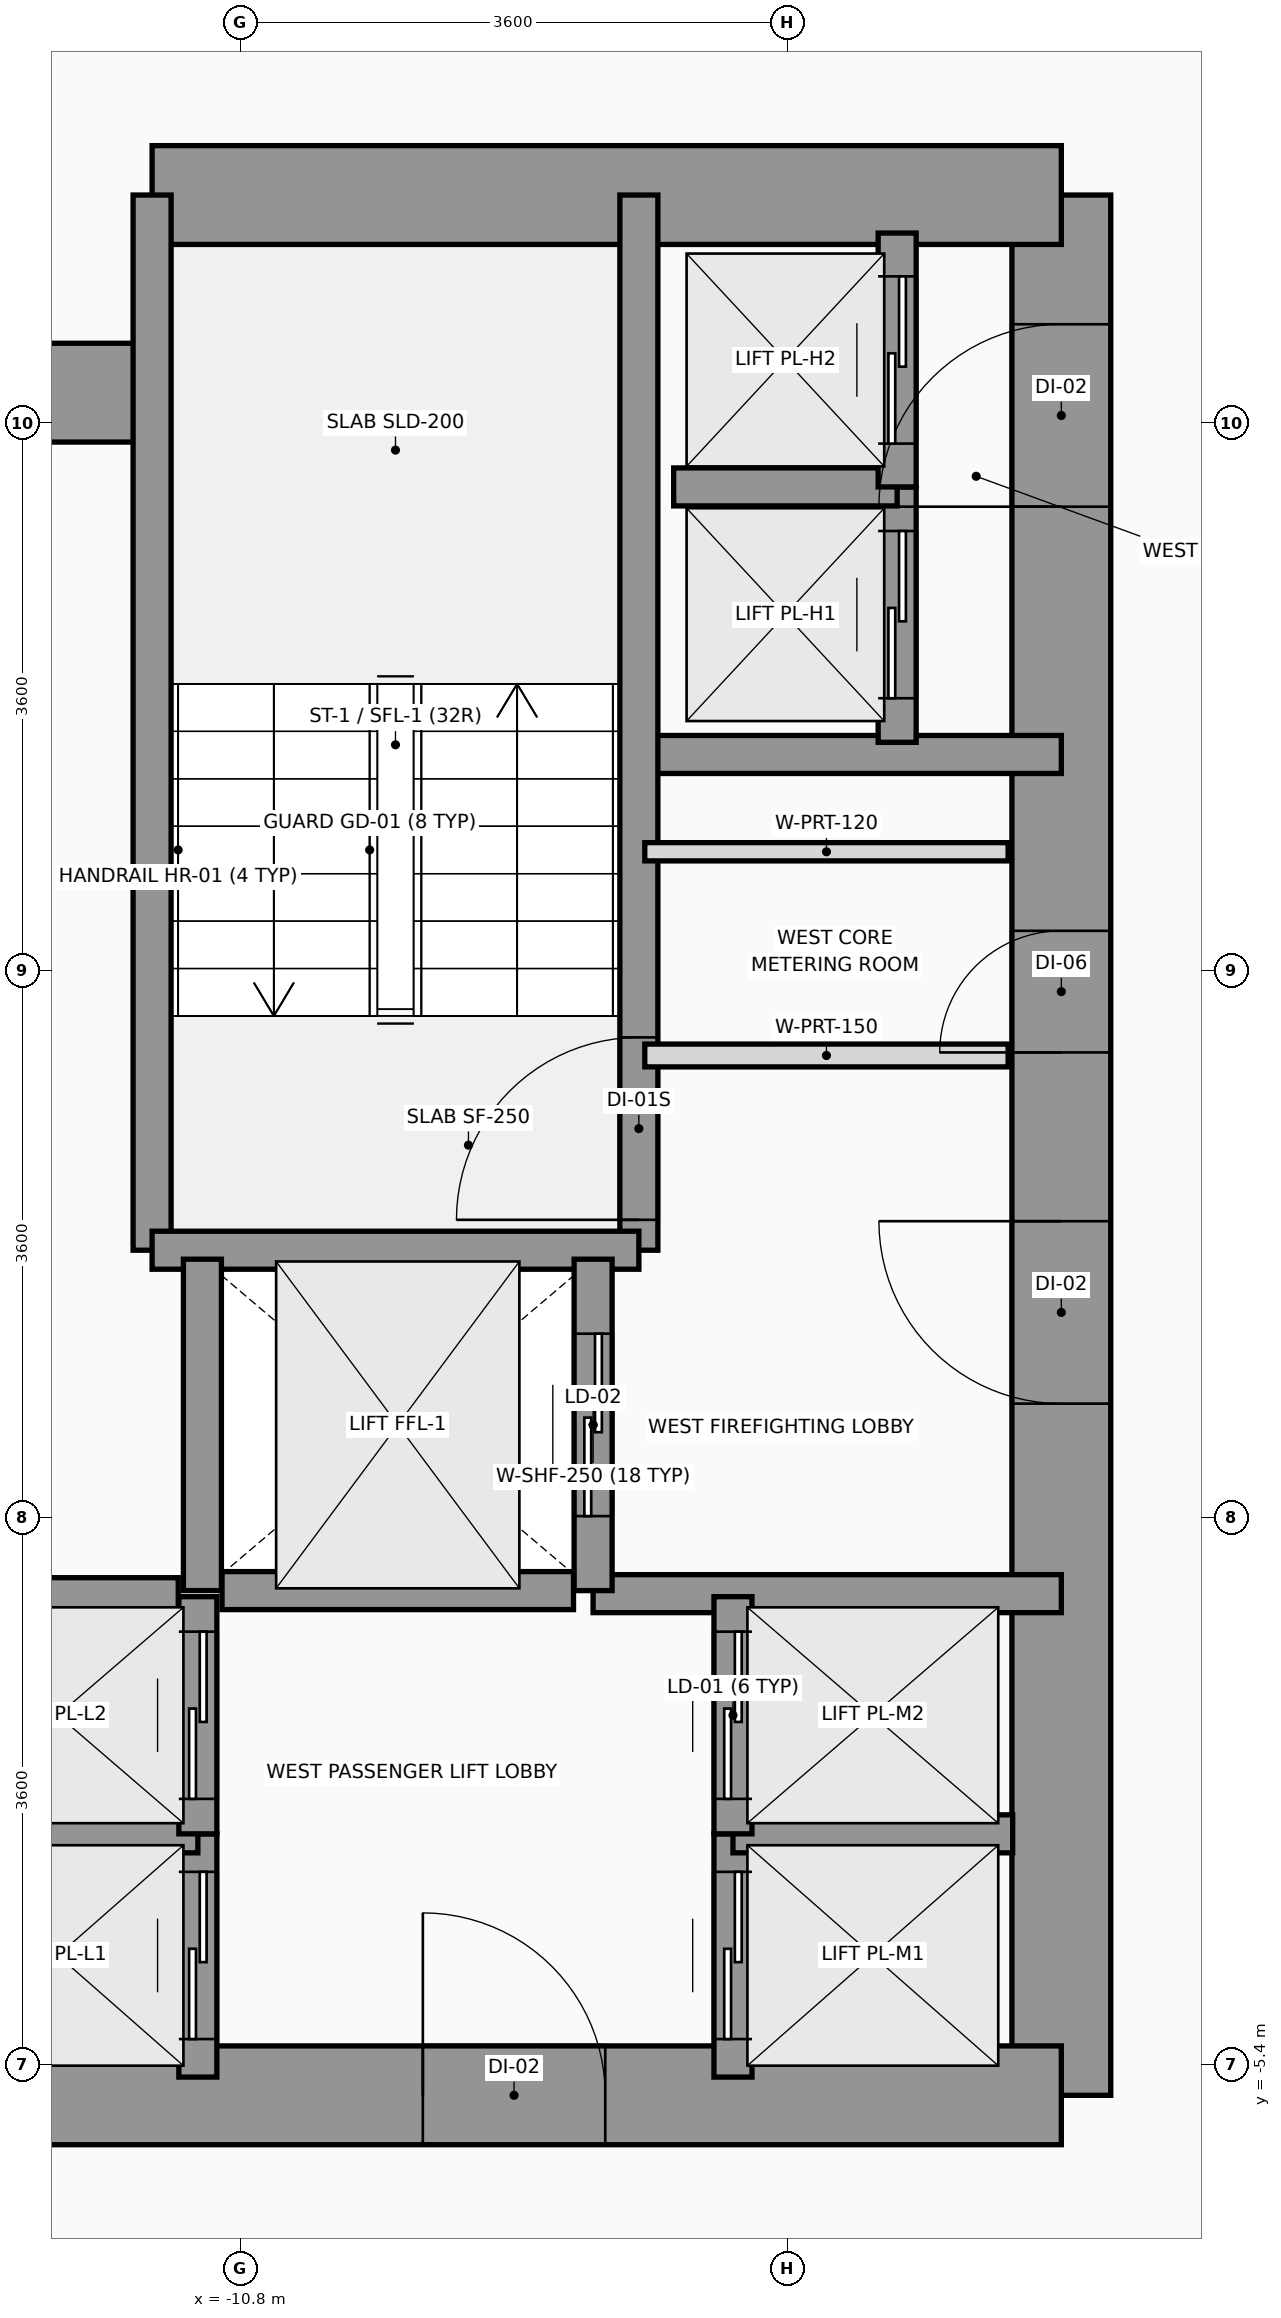
"""IFC4 building model, lengths in metres.
Left out: names, types, materials, properties, quantities, classifications, styles, units other than length and angle.
Written with IfcOpenShell. Run it as: python <this file> out.ifc"""

import sys

from ifc_helpers import new_model, si_unit, direction, frame, frame_2d, origin, place, context, subcontext, project, spatial, rectangle, extrude, source, transform, mapped, element, fill, save


model = new_model("IFC4")
c1 = context("Model", 3, precision=1e-05, world=origin(), true_north=direction((0.0, 1.0)))
c2 = subcontext(c1, "Body", "Model", "MODEL_VIEW")
j1 = project(units=[si_unit("LENGTHUNIT", "METRE"), si_unit("PLANEANGLEUNIT", "RADIAN")], contexts=[c1])
p1 = place(None, origin())
s1 = spatial("IfcSite", under=j1, at=p1, CompositionType="ELEMENT")
p2 = place(p1, origin())
s2 = spatial("IfcBuilding", under=s1, at=p2, CompositionType="ELEMENT")
p3 = place(p2, origin())
s3 = spatial("IfcBuildingStorey", under=s2, at=p3, CompositionType="ELEMENT", Elevation=0.0)
p4 = place(p3, frame((-5.4, -5.6, 0.0), z_axis=(0.0, 0.0, 1.0), x_axis=(0.0, 1.0, 0.0)))
e1 = element("IfcWall", 1, at=p4, inside=s3, PredefinedType="SHEAR", context=c2, shape_type="SweptSolid", body=[
    extrude(rectangle(XDim=12.5, YDim=0.65, at=frame_2d((6.25, 0.0))), origin(), (0.0, 0.0, 1.0), 5.15),
])
p5 = place(p4, frame((4.55, 0.0, 0.0)))
e2 = element("IfcOpeningElement", 2, at=p5, cuts=e1, PredefinedType="OPENING", context=c2, shape_type="SweptSolid", body=[
    extrude(rectangle(XDim=1.2, YDim=2.2, at=frame_2d((0.6, 1.1))), frame((0.0, 0.335, 0.0), z_axis=(0.0, -1.0, 0.0), x_axis=(1.0, 0.0, 0.0)), (0.0, 0.0, 1.0), 0.67),
])
p6 = place(p4, frame((10.45, 0.0, 0.0)))
e3 = element("IfcOpeningElement", 3, at=p6, cuts=e1, PredefinedType="OPENING", context=c2, shape_type="SweptSolid", body=[
    extrude(rectangle(XDim=1.2, YDim=2.2, at=frame_2d((0.6, 1.1))), frame((0.0, 0.335, 0.0), z_axis=(0.0, -1.0, 0.0), x_axis=(1.0, 0.0, 0.0)), (0.0, 0.0, 1.0), 0.67),
])
p7 = place(p4, frame((6.86, 0.0, 0.0)))
e4 = element("IfcOpeningElement", 4, at=p7, cuts=e1, PredefinedType="OPENING", context=c2, shape_type="SweptSolid", body=[
    extrude(rectangle(XDim=0.8, YDim=2.1, at=frame_2d((0.4, 1.05))), frame((0.0, 0.335, 0.0), z_axis=(0.0, -1.0, 0.0), x_axis=(1.0, 0.0, 0.0)), (0.0, 0.0, 1.0), 0.67),
])
p8 = place(p3, frame((-11.381, 6.9, 0.0), z_axis=(0.0, 0.0, 1.0), x_axis=(1.0, 0.0, 0.0)))
e5 = element("IfcWall", 5, at=p8, inside=s3, PredefinedType="SHEAR", context=c2, shape_type="SweptSolid", body=[
    extrude(rectangle(XDim=5.981, YDim=0.65, at=frame_2d((2.991, 0.0))), origin(), (0.0, 0.0, 1.0), 5.15),
])
p9 = place(p3, frame((-13.2, 5.6, 0.0), z_axis=(0.0, 0.0, 1.0), x_axis=(1.0, 0.0, 0.0)))
e6 = element("IfcWall", 6, at=p9, inside=s3, PredefinedType="SHEAR", context=c2, shape_type="SweptSolid", body=[
    extrude(rectangle(XDim=1.819, YDim=0.65, at=frame_2d((0.909, 0.0))), origin(), (0.0, 0.0, 1.0), 5.15),
])
p10 = place(p3, frame((-13.2, -5.6, 0.0), z_axis=(0.0, 0.0, 1.0), x_axis=(1.0, 0.0, 0.0)))
e7 = element("IfcWall", 7, at=p10, inside=s3, PredefinedType="SHEAR", context=c2, shape_type="SweptSolid", body=[
    extrude(rectangle(XDim=7.8, YDim=0.65, at=frame_2d((3.9, 0.0))), origin(), (0.0, 0.0, 1.0), 5.15),
])
p11 = place(p10, frame((3.6, 0.0, 0.0)))
e8 = element("IfcOpeningElement", 8, at=p11, cuts=e7, PredefinedType="OPENING", context=c2, shape_type="SweptSolid", body=[
    extrude(rectangle(XDim=1.2, YDim=2.2, at=frame_2d((0.6, 1.1))), frame((0.0, 0.335, 0.0), z_axis=(0.0, -1.0, 0.0), x_axis=(1.0, 0.0, 0.0)), (0.0, 0.0, 1.0), 0.67),
])
p12 = place(p3, frame((-8.18, 3.22, 0.0), z_axis=(0.0, 0.0, 1.0), x_axis=(1.0, 0.0, 0.0)))
e9 = element("IfcWall", 9, at=p12, inside=s3, PredefinedType="SOLIDWALL", context=c2, shape_type="SweptSolid", body=[
    extrude(rectangle(XDim=2.78, YDim=0.25, at=frame_2d((1.39, 0.0))), origin(), (0.0, 0.0, 1.0), 5.15),
])
p13 = place(p3, frame((-8.48, -2.3, 0.0), z_axis=(0.0, 0.0, 1.0), x_axis=(1.0, 0.0, 0.0)))
e10 = element("IfcWall", 10, at=p13, inside=s3, PredefinedType="SOLIDWALL", context=c2, shape_type="SweptSolid", body=[
    extrude(rectangle(XDim=3.08, YDim=0.25, at=frame_2d((1.54, 0.0))), origin(), (0.0, 0.0, 1.0), 5.15),
])
p14 = place(p3, frame((-8.179, -0.041, 0.0), z_axis=(0.0, 0.0, 1.0), x_axis=(0.0, 1.0, 0.0)))
e11 = element("IfcWall", 11, at=p14, inside=s3, PredefinedType="SOLIDWALL", context=c2, shape_type="SweptSolid", body=[
    extrude(rectangle(XDim=6.941, YDim=0.25, at=frame_2d((3.47, 0.0))), origin(), (0.0, 0.0, 1.0), 5.15),
])
p15 = place(p14, frame((0.2, 0.0, 0.0)))
e12 = element("IfcOpeningElement", 12, at=p15, cuts=e11, PredefinedType="OPENING", context=c2, shape_type="SweptSolid", body=[
    extrude(rectangle(XDim=1.2, YDim=2.2, at=frame_2d((0.6, 1.1))), frame((0.0, 0.135, 0.0), z_axis=(0.0, -1.0, 0.0), x_axis=(1.0, 0.0, 0.0)), (0.0, 0.0, 1.0), 0.27),
])
p16 = place(p3, frame((-11.381, -0.041, 0.0), z_axis=(0.0, 0.0, 1.0), x_axis=(0.0, 1.0, 0.0)))
e13 = element("IfcWall", 13, at=p16, inside=s3, PredefinedType="SOLIDWALL", context=c2, shape_type="SweptSolid", body=[
    extrude(rectangle(XDim=6.941, YDim=0.25, at=frame_2d((3.47, 0.0))), origin(), (0.0, 0.0, 1.0), 5.15),
])
p17 = place(p3, frame((-11.381, -0.041, 0.0), z_axis=(0.0, 0.0, 1.0), x_axis=(1.0, 0.0, 0.0)))
e14 = element("IfcWall", 14, at=p17, inside=s3, PredefinedType="SOLIDWALL", context=c2, shape_type="SweptSolid", body=[
    extrude(rectangle(XDim=3.202, YDim=0.25, at=frame_2d((1.601, 0.0))), origin(), (0.0, 0.0, 1.0), 5.15),
])
p18 = place(p3, frame((-11.05, -2.28, 0.0), z_axis=(0.0, 0.0, 1.0), x_axis=(0.0, 1.0, 0.0)))
e15 = element("IfcWall", 15, at=p18, inside=s3, PredefinedType="SOLIDWALL", context=c2, shape_type="SweptSolid", body=[
    extrude(rectangle(XDim=2.18, YDim=0.25, at=frame_2d((1.09, 0.0))), origin(), (0.0, 0.0, 1.0), 5.15),
])
p19 = place(p3, frame((-8.48, -2.28, 0.0), z_axis=(0.0, 0.0, 1.0), x_axis=(0.0, 1.0, 0.0)))
e16 = element("IfcWall", 16, at=p19, inside=s3, PredefinedType="SOLIDWALL", context=c2, shape_type="SweptSolid", body=[
    extrude(rectangle(XDim=2.18, YDim=0.25, at=frame_2d((1.09, 0.0))), origin(), (0.0, 0.0, 1.0), 5.15),
])
p20 = place(p19, frame((0.49, 0.0, 0.0)))
e17 = element("IfcOpeningElement", 17, at=p20, cuts=e16, PredefinedType="OPENING", context=c2, shape_type="SweptSolid", body=[
    extrude(rectangle(XDim=1.2, YDim=2.2, at=frame_2d((0.6, 1.1))), frame((0.0, 0.135, 0.0), z_axis=(0.0, -1.0, 0.0), x_axis=(1.0, 0.0, 0.0)), (0.0, 0.0, 1.0), 0.27),
])
p21 = place(p3, frame((-10.921, -2.28, 0.0), z_axis=(0.0, 0.0, 1.0), x_axis=(1.0, 0.0, 0.0)))
e18 = element("IfcWall", 18, at=p21, inside=s3, PredefinedType="SOLIDWALL", context=c2, shape_type="SweptSolid", body=[
    extrude(rectangle(XDim=2.312, YDim=0.25, at=frame_2d((1.156, 0.0))), origin(), (0.0, 0.0, 1.0), 5.15),
])
p22 = place(p3, frame((-11.08, -5.48, 0.0), z_axis=(0.0, 0.0, 1.0), x_axis=(0.0, 1.0, 0.0)))
e19 = element("IfcWall", 19, at=p22, inside=s3, PredefinedType="SOLIDWALL", context=c2, shape_type="SweptSolid", body=[
    extrude(rectangle(XDim=1.6, YDim=0.25, at=frame_2d((0.8, 0.0))), origin(), (0.0, 0.0, 1.0), 5.15),
])
p23 = place(p22, frame((0.25, 0.0, 0.0)))
e20 = element("IfcOpeningElement", 20, at=p23, cuts=e19, PredefinedType="OPENING", context=c2, shape_type="SweptSolid", body=[
    extrude(rectangle(XDim=1.1, YDim=2.2, at=frame_2d((0.55, 1.1))), frame((0.0, 0.135, 0.0), z_axis=(0.0, -1.0, 0.0), x_axis=(1.0, 0.0, 0.0)), (0.0, 0.0, 1.0), 0.27),
])
p24 = place(p3, frame((-12.92, -3.88, 0.0), z_axis=(0.0, 0.0, 1.0), x_axis=(1.0, 0.0, 0.0)))
e21 = element("IfcWall", 21, at=p24, inside=s3, PredefinedType="SOLIDWALL", context=c2, shape_type="SweptSolid", body=[
    extrude(rectangle(XDim=1.84, YDim=0.25, at=frame_2d((0.92, 0.0))), origin(), (0.0, 0.0, 1.0), 5.15),
])
p25 = place(p3, frame((-11.08, -3.88, 0.0), z_axis=(0.0, 0.0, 1.0), x_axis=(0.0, 1.0, 0.0)))
e22 = element("IfcWall", 22, at=p25, inside=s3, PredefinedType="SOLIDWALL", context=c2, shape_type="SweptSolid", body=[
    extrude(rectangle(XDim=1.56, YDim=0.25, at=frame_2d((0.78, 0.0))), origin(), (0.0, 0.0, 1.0), 5.15),
])
p26 = place(p25, frame((0.23, 0.0, 0.0)))
e23 = element("IfcOpeningElement", 23, at=p26, cuts=e22, PredefinedType="OPENING", context=c2, shape_type="SweptSolid", body=[
    extrude(rectangle(XDim=1.1, YDim=2.2, at=frame_2d((0.55, 1.1))), frame((0.0, 0.135, 0.0), z_axis=(0.0, -1.0, 0.0), x_axis=(1.0, 0.0, 0.0)), (0.0, 0.0, 1.0), 0.27),
])
p27 = place(p3, frame((-12.791, -2.32, 0.0), z_axis=(0.0, 0.0, 1.0), x_axis=(1.0, 0.0, 0.0)))
e24 = element("IfcWall", 24, at=p27, inside=s3, PredefinedType="SOLIDWALL", context=c2, shape_type="SweptSolid", body=[
    extrude(rectangle(XDim=1.582, YDim=0.25, at=frame_2d((0.791, 0.0))), origin(), (0.0, 0.0, 1.0), 5.15),
])
p28 = place(p3, frame((-7.56, -5.48, 0.0), z_axis=(0.0, 0.0, 1.0), x_axis=(0.0, 1.0, 0.0)))
e25 = element("IfcWall", 25, at=p28, inside=s3, PredefinedType="SOLIDWALL", context=c2, shape_type="SweptSolid", body=[
    extrude(rectangle(XDim=1.6, YDim=0.25, at=frame_2d((0.8, 0.0))), origin(), (0.0, 0.0, 1.0), 5.15),
])
p29 = place(p28, frame((0.25, 0.0, 0.0)))
e26 = element("IfcOpeningElement", 26, at=p29, cuts=e25, PredefinedType="OPENING", context=c2, shape_type="SweptSolid", body=[
    extrude(rectangle(XDim=1.1, YDim=2.2, at=frame_2d((0.55, 1.1))), frame((0.0, 0.135, 0.0), z_axis=(0.0, -1.0, 0.0), x_axis=(1.0, 0.0, 0.0)), (0.0, 0.0, 1.0), 0.27),
])
p30 = place(p3, frame((-7.56, -3.88, 0.0), z_axis=(0.0, 0.0, 1.0), x_axis=(1.0, 0.0, 0.0)))
e27 = element("IfcWall", 27, at=p30, inside=s3, PredefinedType="SOLIDWALL", context=c2, shape_type="SweptSolid", body=[
    extrude(rectangle(XDim=1.84, YDim=0.25, at=frame_2d((0.92, 0.0))), origin(), (0.0, 0.0, 1.0), 5.15),
])
p31 = place(p3, frame((-7.56, -3.88, 0.0), z_axis=(0.0, 0.0, 1.0), x_axis=(0.0, 1.0, 0.0)))
e28 = element("IfcWall", 28, at=p31, inside=s3, PredefinedType="SOLIDWALL", context=c2, shape_type="SweptSolid", body=[
    extrude(rectangle(XDim=1.56, YDim=0.25, at=frame_2d((0.78, 0.0))), origin(), (0.0, 0.0, 1.0), 5.15),
])
p32 = place(p31, frame((0.23, 0.0, 0.0)))
e29 = element("IfcOpeningElement", 29, at=p32, cuts=e28, PredefinedType="OPENING", context=c2, shape_type="SweptSolid", body=[
    extrude(rectangle(XDim=1.1, YDim=2.2, at=frame_2d((0.55, 1.1))), frame((0.0, 0.135, 0.0), z_axis=(0.0, -1.0, 0.0), x_axis=(1.0, 0.0, 0.0)), (0.0, 0.0, 1.0), 0.27),
])
p33 = place(p3, frame((-6.48, 3.3, 0.0), z_axis=(0.0, 0.0, 1.0), x_axis=(0.0, 1.0, 0.0)))
e30 = element("IfcWall", 30, at=p33, inside=s3, PredefinedType="SOLIDWALL", context=c2, shape_type="SweptSolid", body=[
    extrude(rectangle(XDim=1.68, YDim=0.25, at=frame_2d((0.84, 0.0))), origin(), (0.0, 0.0, 1.0), 5.15),
])
p34 = place(p33, frame((0.29, 0.0, 0.0)))
e31 = element("IfcOpeningElement", 31, at=p34, cuts=e30, PredefinedType="OPENING", context=c2, shape_type="SweptSolid", body=[
    extrude(rectangle(XDim=1.1, YDim=2.2, at=frame_2d((0.55, 1.1))), frame((0.0, 0.135, 0.0), z_axis=(0.0, -1.0, 0.0), x_axis=(1.0, 0.0, 0.0)), (0.0, 0.0, 1.0), 0.27),
])
p35 = place(p3, frame((-7.95, 4.98, 0.0), z_axis=(0.0, 0.0, 1.0), x_axis=(1.0, 0.0, 0.0)))
e32 = element("IfcWall", 32, at=p35, inside=s3, PredefinedType="SOLIDWALL", context=c2, shape_type="SweptSolid", body=[
    extrude(rectangle(XDim=1.47, YDim=0.25, at=frame_2d((0.735, 0.0))), origin(), (0.0, 0.0, 1.0), 5.15),
])
p36 = place(p3, frame((-6.48, 4.98, 0.0), z_axis=(0.0, 0.0, 1.0), x_axis=(0.0, 1.0, 0.0)))
e33 = element("IfcWall", 33, at=p36, inside=s3, PredefinedType="SOLIDWALL", context=c2, shape_type="SweptSolid", body=[
    extrude(rectangle(XDim=1.67, YDim=0.25, at=frame_2d((0.835, 0.0))), origin(), (0.0, 0.0, 1.0), 5.15),
])
p37 = place(p36, frame((0.285, 0.0, 0.0)))
e34 = element("IfcOpeningElement", 34, at=p37, cuts=e33, PredefinedType="OPENING", context=c2, shape_type="SweptSolid", body=[
    extrude(rectangle(XDim=1.1, YDim=2.2, at=frame_2d((0.55, 1.1))), frame((0.0, 0.135, 0.0), z_axis=(0.0, -1.0, 0.0), x_axis=(1.0, 0.0, 0.0)), (0.0, 0.0, 1.0), 0.27),
])
p38 = place(p3, frame((-8.14, 1.24, 0.0), z_axis=(0.0, 0.0, 1.0), x_axis=(1.0, 0.0, 0.0)))
e35 = element("IfcWall", 35, at=p38, inside=s3, PredefinedType="PARTITIONING", context=c2, shape_type="SweptSolid", body=[
    extrude(rectangle(XDim=2.39, YDim=0.15, at=frame_2d((1.195, 0.0))), origin(), (0.0, 0.0, 1.0), 4.25),
])
p39 = place(p3, frame((-8.14, 2.58, 0.0), z_axis=(0.0, 0.0, 1.0), x_axis=(1.0, 0.0, 0.0)))
e36 = element("IfcWall", 36, at=p39, inside=s3, PredefinedType="PARTITIONING", context=c2, shape_type="SweptSolid", body=[
    extrude(rectangle(XDim=2.39, YDim=0.12, at=frame_2d((1.195, 0.0))), origin(), (0.0, 0.0, 1.0), 4.25),
])
m1 = source(origin(), c2, "Body", "SweptSolid", [
    extrude(rectangle(XDim=1.2, YDim=2.2, at=frame_2d((0.6, 1.1))), frame((0.0, 0.025, 0.0), z_axis=(0.0, -1.0, 0.0), x_axis=(1.0, 0.0, 0.0)), (0.0, 0.0, 1.0), 0.05),
])
p40 = place(p15, origin())
e37 = element("IfcDoor", 37, at=p40, inside=s3, OperationType="SINGLE_SWING_LEFT", PredefinedType="DOOR", context=c2, shape_type="MappedRepresentation", body=[
    mapped(m1, transform((0.0, 0.0, 0.0), x_axis=(1.0, 0.0, 0.0), y_axis=(0.0, 1.0, 0.0), z_axis=(0.0, 0.0, 1.0), scale=1.0)),
])
fill(e12, e37)
p41 = place(p5, origin())
e38 = element("IfcDoor", 38, at=p41, inside=s3, OperationType="SINGLE_SWING_RIGHT", PredefinedType="DOOR", context=c2, shape_type="MappedRepresentation", body=[
    mapped(m1, transform((0.0, 0.0, 0.0), x_axis=(1.0, 0.0, 0.0), y_axis=(0.0, 1.0, 0.0), z_axis=(0.0, 0.0, 1.0), scale=1.0)),
])
fill(e2, e38)
p42 = place(p6, origin())
e39 = element("IfcDoor", 39, at=p42, inside=s3, OperationType="SINGLE_SWING_LEFT", PredefinedType="DOOR", context=c2, shape_type="MappedRepresentation", body=[
    mapped(m1, transform((0.0, 0.0, 0.0), x_axis=(1.0, 0.0, 0.0), y_axis=(0.0, 1.0, 0.0), z_axis=(0.0, 0.0, 1.0), scale=1.0)),
])
fill(e3, e39)
p43 = place(p11, origin())
e40 = element("IfcDoor", 40, at=p43, inside=s3, OperationType="SINGLE_SWING_LEFT", PredefinedType="DOOR", context=c2, shape_type="MappedRepresentation", body=[
    mapped(m1, transform((0.0, 0.0, 0.0), x_axis=(1.0, 0.0, 0.0), y_axis=(0.0, 1.0, 0.0), z_axis=(0.0, 0.0, 1.0), scale=1.0)),
])
fill(e8, e40)
m2 = source(origin(), c2, "Body", "SweptSolid", [
    extrude(rectangle(XDim=0.8, YDim=2.1, at=frame_2d((0.4, 1.05))), frame((0.0, 0.025, 0.0), z_axis=(0.0, -1.0, 0.0), x_axis=(1.0, 0.0, 0.0)), (0.0, 0.0, 1.0), 0.05),
])
p44 = place(p7, origin())
e41 = element("IfcDoor", 41, at=p44, inside=s3, OperationType="SINGLE_SWING_LEFT", PredefinedType="DOOR", context=c2, shape_type="MappedRepresentation", body=[
    mapped(m2, transform((0.0, 0.0, 0.0), x_axis=(1.0, 0.0, 0.0), y_axis=(0.0, 1.0, 0.0), z_axis=(0.0, 0.0, 1.0), scale=1.0)),
])
fill(e4, e41)
p45 = place(p20, origin())
e42 = element("IfcDoor", 42, at=p45, inside=s3, OperationType="SLIDING_TO_RIGHT", PredefinedType="DOOR", context=c2, shape_type="MappedRepresentation", body=[
    mapped(m1, transform((0.0, 0.0, 0.0), x_axis=(1.0, 0.0, 0.0), y_axis=(0.0, 1.0, 0.0), z_axis=(0.0, 0.0, 1.0), scale=1.0)),
])
fill(e17, e42)
m3 = source(origin(), c2, "Body", "SweptSolid", [
    extrude(rectangle(XDim=1.1, YDim=2.2, at=frame_2d((0.55, 1.1))), frame((0.0, 0.025, 0.0), z_axis=(0.0, -1.0, 0.0), x_axis=(1.0, 0.0, 0.0)), (0.0, 0.0, 1.0), 0.05),
])
p46 = place(p23, origin())
e43 = element("IfcDoor", 43, at=p46, inside=s3, OperationType="SLIDING_TO_LEFT", PredefinedType="DOOR", context=c2, shape_type="MappedRepresentation", body=[
    mapped(m3, transform((0.0, 0.0, 0.0), x_axis=(1.0, 0.0, 0.0), y_axis=(0.0, 1.0, 0.0), z_axis=(0.0, 0.0, 1.0), scale=1.0)),
])
fill(e20, e43)
p47 = place(p26, origin())
e44 = element("IfcDoor", 44, at=p47, inside=s3, OperationType="SLIDING_TO_LEFT", PredefinedType="DOOR", context=c2, shape_type="MappedRepresentation", body=[
    mapped(m3, transform((0.0, 0.0, 0.0), x_axis=(1.0, 0.0, 0.0), y_axis=(0.0, 1.0, 0.0), z_axis=(0.0, 0.0, 1.0), scale=1.0)),
])
fill(e23, e44)
p48 = place(p29, origin())
e45 = element("IfcDoor", 45, at=p48, inside=s3, OperationType="SLIDING_TO_LEFT", PredefinedType="DOOR", context=c2, shape_type="MappedRepresentation", body=[
    mapped(m3, transform((0.0, 0.0, 0.0), x_axis=(1.0, 0.0, 0.0), y_axis=(0.0, 1.0, 0.0), z_axis=(0.0, 0.0, 1.0), scale=1.0)),
])
fill(e26, e45)
p49 = place(p32, origin())
e46 = element("IfcDoor", 46, at=p49, inside=s3, OperationType="SLIDING_TO_LEFT", PredefinedType="DOOR", context=c2, shape_type="MappedRepresentation", body=[
    mapped(m3, transform((0.0, 0.0, 0.0), x_axis=(1.0, 0.0, 0.0), y_axis=(0.0, 1.0, 0.0), z_axis=(0.0, 0.0, 1.0), scale=1.0)),
])
fill(e29, e46)
p50 = place(p34, origin())
e47 = element("IfcDoor", 47, at=p50, inside=s3, OperationType="SLIDING_TO_LEFT", PredefinedType="DOOR", context=c2, shape_type="MappedRepresentation", body=[
    mapped(m3, transform((0.0, 0.0, 0.0), x_axis=(1.0, 0.0, 0.0), y_axis=(0.0, 1.0, 0.0), z_axis=(0.0, 0.0, 1.0), scale=1.0)),
])
fill(e31, e47)
p51 = place(p37, origin())
e48 = element("IfcDoor", 48, at=p51, inside=s3, OperationType="SLIDING_TO_LEFT", PredefinedType="DOOR", context=c2, shape_type="MappedRepresentation", body=[
    mapped(m3, transform((0.0, 0.0, 0.0), x_axis=(1.0, 0.0, 0.0), y_axis=(0.0, 1.0, 0.0), z_axis=(0.0, 0.0, 1.0), scale=1.0)),
])
fill(e34, e48)
save(model, sys.argv[1])
